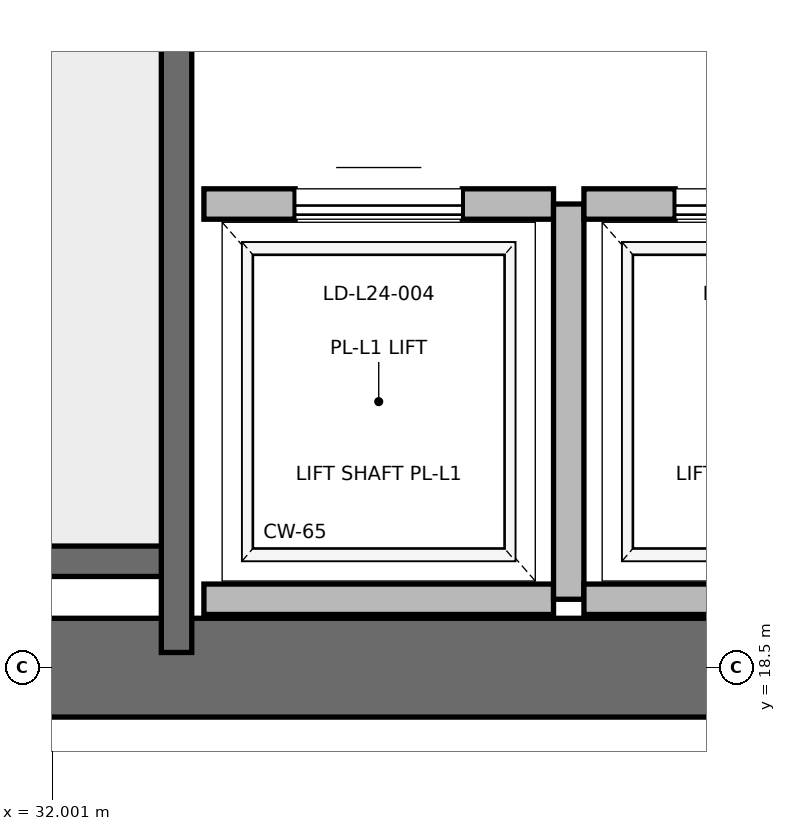
"""IFC4 building model, lengths in metres.
Left out: names, types, materials, properties, quantities, classifications, styles, units other than length and angle.
Written with IfcOpenShell. Run it as: python <this file> out.ifc"""

import sys

from ifc_helpers import new_model, si_unit, direction, frame, frame_2d, origin, place, context, subcontext, project, spatial, rectangle, extrude, element, fill, save


model = new_model("IFC4")
c1 = context("Model", 3, precision=1e-05, world=origin(), true_north=direction((0.0, 1.0)))
c2 = subcontext(c1, "Body", "Model", "MODEL_VIEW")
j1 = project(units=[si_unit("LENGTHUNIT", "METRE"), si_unit("PLANEANGLEUNIT", "RADIAN")], contexts=[c1])
p1 = place(None, origin())
s1 = spatial("IfcSite", under=j1, at=p1, CompositionType="ELEMENT")
p2 = place(p1, origin())
s2 = spatial("IfcBuilding", under=s1, at=p2, CompositionType="ELEMENT")
p3 = place(p2, frame((0.0, 0.0, 103.6)))
s3 = spatial("IfcBuildingStorey", under=s2, at=p3, CompositionType="ELEMENT", Elevation=103.6)
p4 = place(p3, frame((29.0, 18.5, 0.0), z_axis=(0.0, 0.0, 1.0), x_axis=(1.0, 0.0, 0.0)))
e1 = element("IfcWall", 1, at=p4, inside=s3, PredefinedType="SHEAR", context=c2, shape_type="SweptSolid", body=[
    extrude(rectangle(XDim=9.2, YDim=0.65, at=frame_2d((4.6, 0.0))), origin(), (0.0, 0.0, 1.0), 3.7),
])
p5 = place(p3, frame((29.7, 19.2, 0.0), z_axis=(0.0, 0.0, 1.0), x_axis=(1.0, 0.0, 0.0)))
e2 = element("IfcWall", 2, at=p5, inside=s3, PredefinedType="SOLIDWALL", context=c2, shape_type="SweptSolid", body=[
    extrude(rectangle(XDim=3.12, YDim=0.2, at=frame_2d((1.56, 0.0))), origin(), (0.0, 0.0, 1.0), 3.7),
])
p6 = place(p3, frame((32.82, 18.6, 0.0), z_axis=(0.0, 0.0, 1.0), x_axis=(0.0, 1.0, 0.0)))
e3 = element("IfcWall", 3, at=p6, inside=s3, PredefinedType="SOLIDWALL", context=c2, shape_type="SweptSolid", body=[
    extrude(rectangle(XDim=8.78, YDim=0.2, at=frame_2d((4.39, 0.0))), origin(), (0.0, 0.0, 1.0), 3.7),
])
p7 = place(p3, frame((33.0, 18.95, 0.0), z_axis=(0.0, 0.0, 1.0), x_axis=(1.0, 0.0, 0.0)))
e4 = element("IfcWall", 4, at=p7, inside=s3, PredefinedType="SOLIDWALL", context=c2, shape_type="SweptSolid", body=[
    extrude(rectangle(XDim=2.3, YDim=0.2, at=frame_2d((1.15, 0.0))), origin(), (0.0, 0.0, 1.0), 3.7),
])
p8 = place(p3, frame((35.3, 21.55, 0.0), z_axis=(0.0, 0.0, 1.0), x_axis=(-1.0, 0.0, 0.0)))
e5 = element("IfcWall", 5, at=p8, inside=s3, PredefinedType="SOLIDWALL", context=c2, shape_type="SweptSolid", body=[
    extrude(rectangle(XDim=2.3, YDim=0.2, at=frame_2d((1.15, 0.0))), origin(), (0.0, 0.0, 1.0), 3.7),
])
p9 = place(p8, frame((0.6, 0.0, 0.0)))
e6 = element("IfcOpeningElement", 6, at=p9, cuts=e5, PredefinedType="OPENING", context=c2, shape_type="SweptSolid", body=[
    extrude(rectangle(XDim=1.1, YDim=2.2, at=frame_2d((0.55, 1.1))), frame((0.0, 0.1, 0.0), z_axis=(0.0, -1.0, 0.0), x_axis=(1.0, 0.0, 0.0)), (0.0, 0.0, 1.0), 0.2),
])
p10 = place(p3, frame((35.4, 18.95, 0.0), z_axis=(0.0, 0.0, 1.0), x_axis=(0.0, 1.0, 0.0)))
e7 = element("IfcWall", 7, at=p10, inside=s3, PredefinedType="SOLIDWALL", context=c2, shape_type="SweptSolid", body=[
    extrude(rectangle(XDim=2.6, YDim=0.2, at=frame_2d((1.3, 0.0))), origin(), (0.0, 0.0, 1.0), 3.7),
])
p11 = place(p3, frame((35.5, 18.95, 0.0), z_axis=(0.0, 0.0, 1.0), x_axis=(1.0, 0.0, 0.0)))
e8 = element("IfcWall", 8, at=p11, inside=s3, PredefinedType="SOLIDWALL", context=c2, shape_type="SweptSolid", body=[
    extrude(rectangle(XDim=2.3, YDim=0.2, at=frame_2d((1.15, 0.0))), origin(), (0.0, 0.0, 1.0), 2.48),
])
p12 = place(p3, frame((37.8, 21.55, 0.0), z_axis=(0.0, 0.0, 1.0), x_axis=(-1.0, 0.0, 0.0)))
e9 = element("IfcWall", 9, at=p12, inside=s3, PredefinedType="SOLIDWALL", context=c2, shape_type="SweptSolid", body=[
    extrude(rectangle(XDim=2.3, YDim=0.2, at=frame_2d((1.15, 0.0))), origin(), (0.0, 0.0, 1.0), 3.7),
])
p13 = place(p12, frame((0.6, 0.0, 0.0)))
e10 = element("IfcOpeningElement", 10, at=p13, cuts=e9, PredefinedType="OPENING", context=c2, shape_type="SweptSolid", body=[
    extrude(rectangle(XDim=1.1, YDim=2.2, at=frame_2d((0.55, 1.1))), frame((0.0, 0.1, 0.0), z_axis=(0.0, -1.0, 0.0), x_axis=(1.0, 0.0, 0.0)), (0.0, 0.0, 1.0), 0.2),
])
p14 = place(p9, origin())
e11 = element("IfcDoor", 11, at=p14, inside=s3, OperationType="SLIDING_TO_RIGHT", PredefinedType="DOOR", context=c2, shape_type="SweptSolid", body=[
    extrude(rectangle(XDim=1.1, YDim=2.2, at=frame_2d((0.55, 1.1))), frame((0.0, 0.025, 0.0), z_axis=(0.0, -1.0, 0.0), x_axis=(1.0, 0.0, 0.0)), (0.0, 0.0, 1.0), 0.05),
])
fill(e6, e11)
p15 = place(p13, origin())
e12 = element("IfcDoor", 12, at=p15, inside=s3, OperationType="SLIDING_TO_RIGHT", PredefinedType="DOOR", context=c2, shape_type="SweptSolid", body=[
    extrude(rectangle(XDim=1.1, YDim=2.2, at=frame_2d((0.55, 1.1))), frame((0.0, 0.025, 0.0), z_axis=(0.0, -1.0, 0.0), x_axis=(1.0, 0.0, 0.0)), (0.0, 0.0, 1.0), 0.05),
])
fill(e10, e12)
save(model, sys.argv[1])
